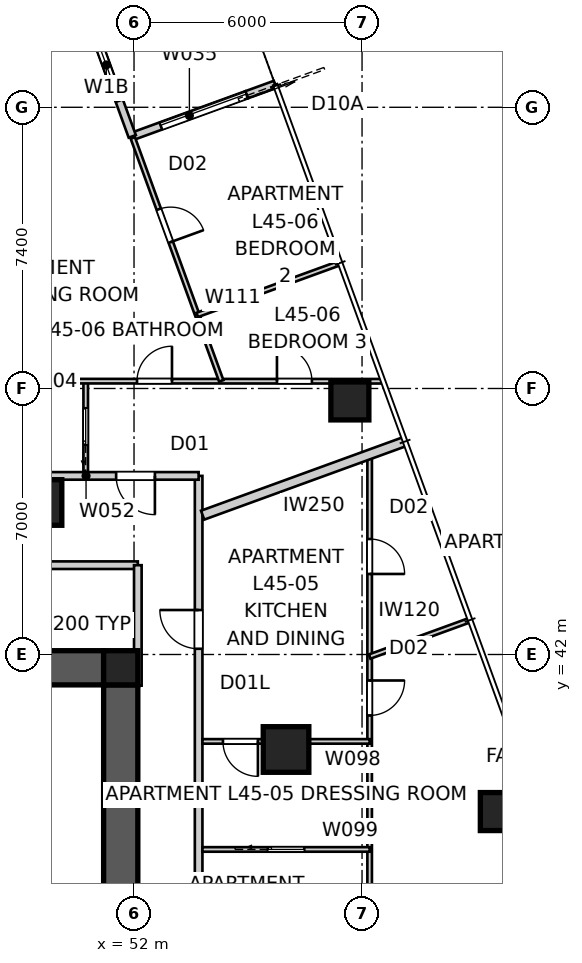
"""IFC4 building model, lengths in metres.
Left out: names, types, materials, properties, quantities, classifications, styles, units other than length and angle.
Written with IfcOpenShell. Run it as: python <this file> out.ifc"""

import sys

from ifc_helpers import new_model, si_unit, direction, frame, frame_2d, origin, origin_2d, place, context, subcontext, project, spatial, polyline, rectangle, outline, extrude, element, fill, save


model = new_model("IFC4")
c1 = context("Model", 3, precision=1e-05, world=origin(), true_north=direction((0.0, 1.0)))
c2 = subcontext(c1, "Body", "Model", "MODEL_VIEW")
j1 = project(units=[si_unit("LENGTHUNIT", "METRE"), si_unit("PLANEANGLEUNIT", "RADIAN")], contexts=[c1])
p1 = place(None, origin())
s1 = spatial("IfcSite", under=j1, at=p1, CompositionType="ELEMENT")
p2 = place(p1, origin())
s2 = spatial("IfcBuilding", under=s1, at=p2, CompositionType="ELEMENT")
p3 = place(p2, frame((0.0, 0.0, 164.2)))
s3 = spatial("IfcBuildingStorey", under=s2, at=p3, CompositionType="ELEMENT", Elevation=164.2)
p4 = place(p3, frame((28.8, 41.65, 0.0), z_axis=(0.0, 0.0, 1.0), x_axis=(1.0, 0.0, 0.0)))
e1 = element("IfcWall", 1, at=p4, inside=s3, PredefinedType="SHEAR", context=c2, shape_type="SweptSolid", body=[
    extrude(outline(polyline([(0.0, -0.45), (22.4, -0.45), (22.4, -0.025), (22.85, -0.025), (22.85, 0.025), (22.4, 0.025), (22.4, 0.45), (0.0, 0.45), (0.0, 0.025), (-0.45, 0.025), (-0.45, -0.025), (0.0, -0.025), (0.0, -0.45)])), origin(), (0.0, 0.0, 1.0), 3.4),
])
p5 = place(p3, frame((51.65, 18.8, 0.0), z_axis=(0.0, 0.0, 1.0), x_axis=(0.0, 1.0, 0.0)))
e2 = element("IfcWall", 2, at=p5, inside=s3, PredefinedType="SHEAR", context=c2, shape_type="SweptSolid", body=[
    extrude(outline(polyline([(0.0, -0.45), (22.4, -0.45), (22.4, -0.025), (22.85, -0.025), (22.85, 0.025), (22.4, 0.025), (22.4, 0.45), (0.0, 0.45), (0.0, 0.025), (-0.45, 0.025), (-0.45, -0.025), (0.0, -0.025), (0.0, -0.45)])), origin(), (0.0, 0.0, 1.0), 3.4),
])
p6 = place(p5, frame((11.14, 0.0, 0.0)))
e3 = element("IfcOpeningElement", 3, at=p6, cuts=e2, PredefinedType="OPENING", context=c2, shape_type="SweptSolid", body=[
    extrude(rectangle(XDim=1.02, YDim=2.4, at=frame_2d((0.51, 1.2))), frame((0.0, 0.46, 0.0), z_axis=(0.0, -1.0, 0.0), x_axis=(1.0, 0.0, 0.0)), (0.0, 0.0, 1.0), 0.92),
])
p7 = place(p3, frame((51.65, 41.65, 0.0), z_axis=(0.0, 0.0, 1.0), x_axis=(1.0, 0.0, 0.0)))
e4 = element("IfcColumn", 4, at=p7, inside=s3, PredefinedType="COLUMN", context=c2, shape_type="SweptSolid", body=[
    extrude(rectangle(XDim=0.9, YDim=0.9, at=origin_2d()), origin(), (0.0, 0.0, 1.0), 3.4),
])
for number, where, z_axis, x_axis in (
    (5, (61.613, 37.866, 0.0), (0.0, 0.0, 1.0), (1.0, 0.0, 0.0)),
    (6, (57.68, 48.673, 0.0), (0.0, 0.0, 1.0), (1.0, 0.0, 0.0)),
):
    element("IfcColumn", number, at=place(p3, frame(where, z_axis=z_axis, x_axis=x_axis)), inside=s3, PredefinedType="COLUMN", context=c2, shape_type="SweptSolid", body=[
        extrude(rectangle(XDim=1.0, YDim=1.0, at=origin_2d()), origin(), (0.0, 0.0, 1.0), 3.4),
    ])
for number, where, z_axis, x_axis in (
    (7, (56.0, 39.5, 0.0), (0.0, 0.0, 1.0), (1.0, 0.0, 0.0)),
    (8, (49.5, 46.0, 0.0), (0.0, 0.0, 1.0), (1.0, 0.0, 0.0)),
):
    element("IfcColumn", number, at=place(p3, frame(where, z_axis=z_axis, x_axis=x_axis)), inside=s3, PredefinedType="COLUMN", context=c2, shape_type="SweptSolid", body=[
        extrude(rectangle(XDim=1.2, YDim=1.2, at=origin_2d()), origin(), (0.0, 0.0, 1.0), 3.4),
    ])
p8 = place(p3, frame((55.712, 57.002, 0.0), z_axis=(0.0, 0.0, 1.0), x_axis=(-0.939659694648, -0.342110593602, 0.0)))
e9 = element("IfcWall", 9, at=p8, inside=s3, PredefinedType="SOLIDWALL", context=c2, shape_type="SweptSolid", body=[
    extrude(rectangle(XDim=0.8, YDim=0.2, at=frame_2d((0.4, 0.0))), origin(), (0.0, 0.0, 1.0), 3.25),
])
p9 = place(p3, frame((54.96, 56.729, 0.0), z_axis=(0.0, 0.0, 1.0), x_axis=(-0.939693144909, -0.342018703306, 0.0)))
e10 = element("IfcWall", 10, at=p9, inside=s3, PredefinedType="SOLIDWALL", context=c2, shape_type="SweptSolid", body=[
    extrude(rectangle(XDim=3.2, YDim=0.2, at=frame_2d((1.6, 0.0))), origin(), (0.0, 0.0, 1.0), 2.722),
])
p10 = place(p9, origin())
e11 = element("IfcOpeningElement", 11, at=p10, cuts=e10, PredefinedType="OPENING", context=c2, shape_type="SweptSolid", body=[
    extrude(rectangle(XDim=2.4, YDim=2.1, at=frame_2d((1.2, 1.05))), frame((0.0, 0.11, 0.0), z_axis=(0.0, -1.0, 0.0), x_axis=(1.0, 0.0, 0.0)), (0.0, 0.0, 1.0), 0.22),
])
p11 = place(p3, frame((51.953, 55.634, 0.0), z_axis=(0.0, 0.0, 1.0), x_axis=(-0.341965219194, 0.939712609717, 0.0)))
e12 = element("IfcWall", 12, at=p11, inside=s3, PredefinedType="SOLIDWALL", context=c2, shape_type="SweptSolid", body=[
    extrude(rectangle(XDim=3.0, YDim=0.2, at=frame_2d((1.5, 0.0))), origin(), (0.0, 0.0, 1.0), 2.722),
])
p12 = place(p11, frame((1.0, 0.0, 0.45)))
e13 = element("IfcOpeningElement", 13, at=p12, cuts=e12, PredefinedType="OPENING", context=c2, shape_type="SweptSolid", body=[
    extrude(rectangle(XDim=2.0, YDim=1.8, at=frame_2d((1.0, 0.9))), frame((0.0, 0.11, 0.0), z_axis=(0.0, -1.0, 0.0), x_axis=(1.0, 0.0, 0.0)), (0.0, 0.0, 1.0), 0.22),
])
p13 = place(p3, frame((53.7, 12.9, 0.0), z_axis=(0.0, 0.0, 1.0), x_axis=(0.0, 1.0, 0.0)))
e14 = element("IfcWall", 14, at=p13, inside=s3, PredefinedType="PARTITIONING", context=c2, shape_type="SweptSolid", body=[
    extrude(rectangle(XDim=33.8, YDim=0.2, at=frame_2d((16.9, 0.0))), origin(), (0.0, 0.0, 1.0), 3.25),
])
p14 = place(p13, frame((29.25, 0.0, 0.0)))
e15 = element("IfcOpeningElement", 15, at=p14, cuts=e14, PredefinedType="OPENING", context=c2, shape_type="SweptSolid", body=[
    extrude(rectangle(XDim=1.02, YDim=2.1, at=frame_2d((0.51, 1.05))), frame((0.0, 0.11, 0.0), z_axis=(0.0, -1.0, 0.0), x_axis=(1.0, 0.0, 0.0)), (0.0, 0.0, 1.0), 0.22),
])
p15 = place(p13, frame((2.87, 0.0, 0.0)))
e16 = element("IfcOpeningElement", 16, at=p15, cuts=e14, PredefinedType="OPENING", context=c2, shape_type="SweptSolid", body=[
    extrude(rectangle(XDim=1.02, YDim=2.34, at=frame_2d((0.51, 1.17))), frame((0.0, 0.11, 0.0), z_axis=(0.0, -1.0, 0.0), x_axis=(1.0, 0.0, 0.0)), (0.0, 0.0, 1.0), 0.22),
])
p16 = place(p3, frame((53.7, 46.7, 0.0), z_axis=(0.0, 0.0, 1.0), x_axis=(-1.0, 0.0, 0.0)))
e17 = element("IfcWall", 17, at=p16, inside=s3, PredefinedType="PARTITIONING", context=c2, shape_type="SweptSolid", body=[
    extrude(rectangle(XDim=5.925, YDim=0.2, at=frame_2d((2.962, 0.0))), origin(), (0.0, 0.0, 1.0), 3.25),
])
p17 = place(p16, frame((1.151, 0.0, 0.0)))
e18 = element("IfcOpeningElement", 18, at=p17, cuts=e17, PredefinedType="OPENING", context=c2, shape_type="SweptSolid", body=[
    extrude(rectangle(XDim=1.02, YDim=2.34, at=frame_2d((0.51, 1.17))), frame((0.0, 0.11, 0.0), z_axis=(0.0, -1.0, 0.0), x_axis=(1.0, 0.0, 0.0)), (0.0, 0.0, 1.0), 0.22),
])
p18 = place(p3, frame((59.132, 47.605, 0.0), z_axis=(0.0, 0.0, 1.0), x_axis=(-0.939690274876, -0.342026588591, 0.0)))
e19 = element("IfcWall", 19, at=p18, inside=s3, PredefinedType="PARTITIONING", context=c2, shape_type="SweptSolid", body=[
    extrude(rectangle(XDim=5.669, YDim=0.25, at=frame_2d((2.834, 0.0))), origin(), (0.0, 0.0, 1.0), 3.25),
])
p19 = place(p3, frame((52.1, 44.35, 0.0), z_axis=(0.0, 0.0, 1.0), x_axis=(-1.0, 0.0, 0.0)))
e20 = element("IfcWall", 20, at=p19, inside=s3, PredefinedType="PARTITIONING", context=c2, shape_type="SweptSolid", body=[
    extrude(rectangle(XDim=24.2, YDim=0.2, at=frame_2d((12.1, 0.0))), origin(), (0.0, 0.0, 1.0), 3.25),
])
p20 = place(p19, frame((12.437, 0.0, 0.0)))
e21 = element("IfcOpeningElement", 21, at=p20, cuts=e20, PredefinedType="OPENING", context=c2, shape_type="SweptSolid", body=[
    extrude(rectangle(XDim=1.02, YDim=2.1, at=frame_2d((0.51, 1.05))), frame((0.0, 0.11, 0.0), z_axis=(0.0, -1.0, 0.0), x_axis=(1.0, 0.0, 0.0)), (0.0, 0.0, 1.0), 0.22),
])
p21 = place(p19, frame((3.544, 0.0, 0.0)))
e22 = element("IfcOpeningElement", 22, at=p21, cuts=e20, PredefinedType="OPENING", context=c2, shape_type="SweptSolid", body=[
    extrude(rectangle(XDim=1.02, YDim=2.1, at=frame_2d((0.51, 1.05))), frame((0.0, 0.11, 0.0), z_axis=(0.0, -1.0, 0.0), x_axis=(1.0, 0.0, 0.0)), (0.0, 0.0, 1.0), 0.22),
])
p22 = place(p19, frame((19.883, 0.0, 0.0)))
e23 = element("IfcOpeningElement", 23, at=p22, cuts=e20, PredefinedType="OPENING", context=c2, shape_type="SweptSolid", body=[
    extrude(rectangle(XDim=1.02, YDim=2.1, at=frame_2d((0.51, 1.05))), frame((0.0, 0.11, 0.0), z_axis=(0.0, -1.0, 0.0), x_axis=(1.0, 0.0, 0.0)), (0.0, 0.0, 1.0), 0.22),
])
p23 = place(p3, frame((52.1, 41.18, 0.0), z_axis=(0.0, 0.0, 1.0), x_axis=(0.0, 1.0, 0.0)))
e24 = element("IfcWall", 24, at=p23, inside=s3, PredefinedType="PARTITIONING", context=c2, shape_type="SweptSolid", body=[
    extrude(rectangle(XDim=3.17, YDim=0.2, at=frame_2d((1.585, 0.0))), origin(), (0.0, 0.0, 1.0), 3.25),
])
p24 = place(p3, frame((58.2, 47.266, 0.0), z_axis=(0.0, 0.0, 1.0), x_axis=(0.0, -1.0, 0.0)))
e25 = element("IfcWall", 25, at=p24, inside=s3, PredefinedType="PARTITIONING", context=c2, shape_type="SweptSolid", body=[
    extrude(rectangle(XDim=36.14, YDim=0.12, at=frame_2d((18.07, 0.0))), origin(), (0.0, 0.0, 1.0), 3.25),
])
p25 = place(p24, frame((2.227, 0.0, 0.0)))
e26 = element("IfcOpeningElement", 26, at=p25, cuts=e25, PredefinedType="OPENING", context=c2, shape_type="SweptSolid", body=[
    extrude(rectangle(XDim=0.92, YDim=2.34, at=frame_2d((0.46, 1.17))), frame((0.0, 0.07, 0.0), z_axis=(0.0, -1.0, 0.0), x_axis=(1.0, 0.0, 0.0)), (0.0, 0.0, 1.0), 0.14),
])
p26 = place(p24, frame((5.95, 0.0, 0.0)))
e27 = element("IfcOpeningElement", 27, at=p26, cuts=e25, PredefinedType="OPENING", context=c2, shape_type="SweptSolid", body=[
    extrude(rectangle(XDim=0.92, YDim=2.34, at=frame_2d((0.46, 1.17))), frame((0.0, 0.07, 0.0), z_axis=(0.0, -1.0, 0.0), x_axis=(1.0, 0.0, 0.0)), (0.0, 0.0, 1.0), 0.14),
])
p27 = place(p24, frame((29.769, 0.0, 0.0)))
e28 = element("IfcOpeningElement", 28, at=p27, cuts=e25, PredefinedType="OPENING", context=c2, shape_type="SweptSolid", body=[
    extrude(rectangle(XDim=0.92, YDim=2.34, at=frame_2d((0.46, 1.17))), frame((0.0, 0.07, 0.0), z_axis=(0.0, -1.0, 0.0), x_axis=(1.0, 0.0, 0.0)), (0.0, 0.0, 1.0), 0.14),
])
p28 = place(p24, frame((14.168, 0.0, 0.0)))
e29 = element("IfcOpeningElement", 29, at=p28, cuts=e25, PredefinedType="OPENING", context=c2, shape_type="SweptSolid", body=[
    extrude(rectangle(XDim=0.92, YDim=2.34, at=frame_2d((0.46, 1.17))), frame((0.0, 0.07, 0.0), z_axis=(0.0, -1.0, 0.0), x_axis=(1.0, 0.0, 0.0)), (0.0, 0.0, 1.0), 0.14),
])
p29 = place(p24, frame((33.434, 0.0, 0.0)))
e30 = element("IfcOpeningElement", 30, at=p29, cuts=e25, PredefinedType="OPENING", context=c2, shape_type="SweptSolid", body=[
    extrude(rectangle(XDim=0.92, YDim=2.34, at=frame_2d((0.46, 1.17))), frame((0.0, 0.07, 0.0), z_axis=(0.0, -1.0, 0.0), x_axis=(1.0, 0.0, 0.0)), (0.0, 0.0, 1.0), 0.14),
])
p30 = place(p3, frame((58.2, 39.713, 0.0), z_axis=(0.0, 0.0, 1.0), x_axis=(-1.0, 0.0, 0.0)))
e31 = element("IfcWall", 31, at=p30, inside=s3, PredefinedType="PARTITIONING", context=c2, shape_type="SweptSolid", body=[
    extrude(rectangle(XDim=4.4, YDim=0.12, at=frame_2d((2.2, 0.0))), origin(), (0.0, 0.0, 1.0), 3.25),
])
p31 = place(p30, frame((2.94, 0.0, 0.0)))
e32 = element("IfcOpeningElement", 32, at=p31, cuts=e31, PredefinedType="OPENING", context=c2, shape_type="SweptSolid", body=[
    extrude(rectangle(XDim=0.92, YDim=2.34, at=frame_2d((0.46, 1.17))), frame((0.0, 0.07, 0.0), z_axis=(0.0, -1.0, 0.0), x_axis=(1.0, 0.0, 0.0)), (0.0, 0.0, 1.0), 0.14),
])
p32 = place(p3, frame((53.8, 36.87, 0.0), z_axis=(0.0, 0.0, 1.0), x_axis=(1.0, 0.0, 0.0)))
e33 = element("IfcWall", 33, at=p32, inside=s3, PredefinedType="PARTITIONING", context=c2, shape_type="SweptSolid", body=[
    extrude(rectangle(XDim=4.4, YDim=0.12, at=frame_2d((2.2, 0.0))), origin(), (0.0, 0.0, 1.0), 3.25),
])
p33 = place(p32, frame((1.72, 0.0, 0.0)))
e34 = element("IfcOpeningElement", 34, at=p33, cuts=e33, PredefinedType="OPENING", context=c2, shape_type="SweptSolid", body=[
    extrude(rectangle(XDim=0.96, YDim=2.1, at=frame_2d((0.48, 1.05))), frame((0.0, 0.07, 0.0), z_axis=(0.0, -1.0, 0.0), x_axis=(1.0, 0.0, 0.0)), (0.0, 0.0, 1.0), 0.14),
])
p34 = place(p3, frame((58.2, 41.945, 0.0), z_axis=(0.0, 0.0, 1.0), x_axis=(0.939680234176, 0.34205417334, 0.0)))
e35 = element("IfcWall", 35, at=p34, inside=s3, PredefinedType="PARTITIONING", context=c2, shape_type="SweptSolid", body=[
    extrude(rectangle(XDim=2.772, YDim=0.12, at=frame_2d((1.386, 0.0))), origin(), (0.0, 0.0, 1.0), 3.25),
])
p35 = place(p3, frame((50.729, 46.8, 0.0), z_axis=(0.0, 0.0, 1.0), x_axis=(0.0, 1.0, 0.0)))
e36 = element("IfcWall", 36, at=p35, inside=s3, PredefinedType="PARTITIONING", context=c2, shape_type="SweptSolid", body=[
    extrude(rectangle(XDim=2.4, YDim=0.12, at=frame_2d((1.2, 0.0))), origin(), (0.0, 0.0, 1.0), 3.25),
])
p36 = place(p35, frame((0.72, 0.0, 0.0)))
e37 = element("IfcOpeningElement", 37, at=p36, cuts=e36, PredefinedType="OPENING", context=c2, shape_type="SweptSolid", body=[
    extrude(rectangle(XDim=0.96, YDim=2.1, at=frame_2d((0.48, 1.05))), frame((0.0, 0.07, 0.0), z_axis=(0.0, -1.0, 0.0), x_axis=(1.0, 0.0, 0.0)), (0.0, 0.0, 1.0), 0.14),
])
p37 = place(p3, frame((27.691, 49.2, 0.0), z_axis=(0.0, 0.0, 1.0), x_axis=(0.999999952285, -0.000308918217, 0.0)))
e38 = element("IfcWall", 38, at=p37, inside=s3, PredefinedType="PARTITIONING", context=c2, shape_type="SweptSolid", body=[
    extrude(rectangle(XDim=30.822, YDim=0.12, at=frame_2d((15.411, 0.0))), origin(), (0.0, 0.0, 1.0), 3.25),
])
p38 = place(p37, frame((5.882, 0.0, 0.0)))
e39 = element("IfcOpeningElement", 39, at=p38, cuts=e38, PredefinedType="OPENING", context=c2, shape_type="SweptSolid", body=[
    extrude(rectangle(XDim=0.92, YDim=2.34, at=frame_2d((0.46, 1.17))), frame((0.0, 0.07, 0.0), z_axis=(0.0, -1.0, 0.0), x_axis=(1.0, 0.0, 0.0)), (0.0, 0.0, 1.0), 0.14),
])
p39 = place(p37, frame((28.07, 0.0, 0.0)))
e40 = element("IfcOpeningElement", 40, at=p39, cuts=e38, PredefinedType="OPENING", context=c2, shape_type="SweptSolid", body=[
    extrude(rectangle(XDim=0.92, YDim=2.34, at=frame_2d((0.46, 1.17))), frame((0.0, 0.07, 0.0), z_axis=(0.0, -1.0, 0.0), x_axis=(1.0, 0.0, 0.0)), (0.0, 0.0, 1.0), 0.14),
])
p40 = place(p37, frame((24.388, 0.0, 0.0)))
e41 = element("IfcOpeningElement", 41, at=p40, cuts=e38, PredefinedType="OPENING", context=c2, shape_type="SweptSolid", body=[
    extrude(rectangle(XDim=0.92, YDim=2.34, at=frame_2d((0.46, 1.17))), frame((0.0, 0.07, 0.0), z_axis=(0.0, -1.0, 0.0), x_axis=(1.0, 0.0, 0.0)), (0.0, 0.0, 1.0), 0.14),
])
p41 = place(p37, frame((1.506, 0.0, 0.0)))
e42 = element("IfcOpeningElement", 42, at=p41, cuts=e38, PredefinedType="OPENING", context=c2, shape_type="SweptSolid", body=[
    extrude(rectangle(XDim=0.96, YDim=2.1, at=frame_2d((0.48, 1.05))), frame((0.0, 0.07, 0.0), z_axis=(0.0, -1.0, 0.0), x_axis=(1.0, 0.0, 0.0)), (0.0, 0.0, 1.0), 0.14),
])
p42 = place(p37, frame((17.158, 0.0, 0.0)))
e43 = element("IfcOpeningElement", 43, at=p42, cuts=e38, PredefinedType="OPENING", context=c2, shape_type="SweptSolid", body=[
    extrude(rectangle(XDim=0.96, YDim=2.1, at=frame_2d((0.48, 1.05))), frame((0.0, 0.07, 0.0), z_axis=(0.0, -1.0, 0.0), x_axis=(1.0, 0.0, 0.0)), (0.0, 0.0, 1.0), 0.14),
])
p43 = place(p37, frame((9.026, 0.0, 0.0)))
e44 = element("IfcOpeningElement", 44, at=p43, cuts=e38, PredefinedType="OPENING", context=c2, shape_type="SweptSolid", body=[
    extrude(rectangle(XDim=0.96, YDim=2.1, at=frame_2d((0.48, 1.05))), frame((0.0, 0.07, 0.0), z_axis=(0.0, -1.0, 0.0), x_axis=(1.0, 0.0, 0.0)), (0.0, 0.0, 1.0), 0.14),
])
p44 = place(p37, frame((13.788, 0.0, 0.0)))
e45 = element("IfcOpeningElement", 45, at=p44, cuts=e38, PredefinedType="OPENING", context=c2, shape_type="SweptSolid", body=[
    extrude(rectangle(XDim=0.96, YDim=2.1, at=frame_2d((0.48, 1.05))), frame((0.0, 0.07, 0.0), z_axis=(0.0, -1.0, 0.0), x_axis=(1.0, 0.0, 0.0)), (0.0, 0.0, 1.0), 0.14),
])
p45 = place(p3, frame((51.967, 55.597, 0.0), z_axis=(0.0, 0.0, 1.0), x_axis=(0.342039648023, -0.939685521427, 0.0)))
e46 = element("IfcWall", 46, at=p45, inside=s3, PredefinedType="PARTITIONING", context=c2, shape_type="SweptSolid", body=[
    extrude(rectangle(XDim=6.807, YDim=0.12, at=frame_2d((3.404, 0.0))), origin(), (0.0, 0.0, 1.0), 3.25),
])
p46 = place(p45, frame((2.0, 0.0, 0.0)))
e47 = element("IfcOpeningElement", 47, at=p46, cuts=e46, PredefinedType="OPENING", context=c2, shape_type="SweptSolid", body=[
    extrude(rectangle(XDim=0.92, YDim=2.34, at=frame_2d((0.46, 1.17))), frame((0.0, 0.07, 0.0), z_axis=(0.0, -1.0, 0.0), x_axis=(1.0, 0.0, 0.0)), (0.0, 0.0, 1.0), 0.14),
])
p47 = place(p3, frame((57.385, 52.29, 0.0), z_axis=(0.0, 0.0, 1.0), x_axis=(-0.939685374709, -0.342040051101, 0.0)))
e48 = element("IfcWall", 48, at=p47, inside=s3, PredefinedType="PARTITIONING", context=c2, shape_type="SweptSolid", body=[
    extrude(rectangle(XDim=3.96, YDim=0.12, at=frame_2d((1.98, 0.0))), origin(), (0.0, 0.0, 1.0), 3.25),
])
p48 = place(p10, origin())
e49 = element("IfcDoor", 49, at=p48, inside=s3, OperationType="SLIDING_TO_LEFT", PredefinedType="DOOR", context=c2, shape_type="SweptSolid", body=[
    extrude(rectangle(XDim=2.4, YDim=2.1, at=frame_2d((1.2, 1.05))), frame((0.0, 0.025, 0.0), z_axis=(0.0, -1.0, 0.0), x_axis=(1.0, 0.0, 0.0)), (0.0, 0.0, 1.0), 0.05),
])
fill(e11, e49)
p49 = place(p12, origin())
e50 = element("IfcWindow", 50, at=p49, inside=s3, PartitioningType="SINGLE_PANEL", PredefinedType="WINDOW", context=c2, shape_type="SweptSolid", body=[
    extrude(rectangle(XDim=2.0, YDim=1.8, at=frame_2d((1.0, 0.9))), frame((0.0, 0.03, 0.0), z_axis=(0.0, -1.0, 0.0), x_axis=(1.0, 0.0, 0.0)), (0.0, 0.0, 1.0), 0.06),
])
fill(e13, e50)
p50 = place(p14, origin())
e51 = element("IfcDoor", 51, at=p50, inside=s3, OperationType="SINGLE_SWING_RIGHT", PredefinedType="DOOR", context=c2, shape_type="SweptSolid", body=[
    extrude(rectangle(XDim=1.02, YDim=2.1, at=frame_2d((0.51, 1.05))), frame((0.0, 0.025, 0.0), z_axis=(0.0, -1.0, 0.0), x_axis=(1.0, 0.0, 0.0)), (0.0, 0.0, 1.0), 0.05),
])
fill(e15, e51)
p51 = place(p17, origin())
e52 = element("IfcDoor", 52, at=p51, inside=s3, OperationType="SINGLE_SWING_LEFT", PredefinedType="DOOR", context=c2, shape_type="SweptSolid", body=[
    extrude(rectangle(XDim=1.02, YDim=2.34, at=frame_2d((0.51, 1.17))), frame((0.0, 0.025, 0.0), z_axis=(0.0, -1.0, 0.0), x_axis=(1.0, 0.0, 0.0)), (0.0, 0.0, 1.0), 0.05),
])
fill(e18, e52)
p52 = place(p25, origin())
e53 = element("IfcDoor", 53, at=p52, inside=s3, OperationType="SINGLE_SWING_RIGHT", PredefinedType="DOOR", context=c2, shape_type="SweptSolid", body=[
    extrude(rectangle(XDim=0.92, YDim=2.34, at=frame_2d((0.46, 1.17))), frame((0.0, 0.025, 0.0), z_axis=(0.0, -1.0, 0.0), x_axis=(1.0, 0.0, 0.0)), (0.0, 0.0, 1.0), 0.05),
])
fill(e26, e53)
p53 = place(p31, origin())
e54 = element("IfcDoor", 54, at=p53, inside=s3, OperationType="SINGLE_SWING_LEFT", PredefinedType="DOOR", context=c2, shape_type="SweptSolid", body=[
    extrude(rectangle(XDim=0.92, YDim=2.34, at=frame_2d((0.46, 1.17))), frame((0.0, 0.025, 0.0), z_axis=(0.0, -1.0, 0.0), x_axis=(1.0, 0.0, 0.0)), (0.0, 0.0, 1.0), 0.05),
])
fill(e32, e54)
p54 = place(p26, origin())
e55 = element("IfcDoor", 55, at=p54, inside=s3, OperationType="SINGLE_SWING_LEFT", PredefinedType="DOOR", context=c2, shape_type="SweptSolid", body=[
    extrude(rectangle(XDim=0.92, YDim=2.34, at=frame_2d((0.46, 1.17))), frame((0.0, 0.025, 0.0), z_axis=(0.0, -1.0, 0.0), x_axis=(1.0, 0.0, 0.0)), (0.0, 0.0, 1.0), 0.05),
])
fill(e27, e55)
p55 = place(p39, origin())
e56 = element("IfcDoor", 56, at=p55, inside=s3, OperationType="SINGLE_SWING_LEFT", PredefinedType="DOOR", context=c2, shape_type="SweptSolid", body=[
    extrude(rectangle(XDim=0.92, YDim=2.34, at=frame_2d((0.46, 1.17))), frame((0.0, 0.025, 0.0), z_axis=(0.0, -1.0, 0.0), x_axis=(1.0, 0.0, 0.0)), (0.0, 0.0, 1.0), 0.05),
])
fill(e40, e56)
p56 = place(p40, origin())
e57 = element("IfcDoor", 57, at=p56, inside=s3, OperationType="SINGLE_SWING_RIGHT", PredefinedType="DOOR", context=c2, shape_type="SweptSolid", body=[
    extrude(rectangle(XDim=0.92, YDim=2.34, at=frame_2d((0.46, 1.17))), frame((0.0, 0.025, 0.0), z_axis=(0.0, -1.0, 0.0), x_axis=(1.0, 0.0, 0.0)), (0.0, 0.0, 1.0), 0.05),
])
fill(e41, e57)
p57 = place(p36, origin())
e58 = element("IfcDoor", 58, at=p57, inside=s3, OperationType="SLIDING_TO_LEFT", PredefinedType="DOOR", context=c2, shape_type="SweptSolid", body=[
    extrude(rectangle(XDim=0.96, YDim=2.1, at=frame_2d((0.48, 1.05))), frame((0.0, 0.025, 0.0), z_axis=(0.0, -1.0, 0.0), x_axis=(1.0, 0.0, 0.0)), (0.0, 0.0, 1.0), 0.05),
])
fill(e37, e58)
p58 = place(p33, origin())
e59 = element("IfcDoor", 59, at=p58, inside=s3, OperationType="SLIDING_TO_LEFT", PredefinedType="DOOR", context=c2, shape_type="SweptSolid", body=[
    extrude(rectangle(XDim=0.96, YDim=2.1, at=frame_2d((0.48, 1.05))), frame((0.0, 0.025, 0.0), z_axis=(0.0, -1.0, 0.0), x_axis=(1.0, 0.0, 0.0)), (0.0, 0.0, 1.0), 0.05),
])
fill(e34, e59)
p59 = place(p46, origin())
e60 = element("IfcDoor", 60, at=p59, inside=s3, OperationType="SINGLE_SWING_RIGHT", PredefinedType="DOOR", context=c2, shape_type="SweptSolid", body=[
    extrude(rectangle(XDim=0.92, YDim=2.34, at=frame_2d((0.46, 1.17))), frame((0.0, 0.025, 0.0), z_axis=(0.0, -1.0, 0.0), x_axis=(1.0, 0.0, 0.0)), (0.0, 0.0, 1.0), 0.05),
])
fill(e47, e60)
save(model, sys.argv[1])
